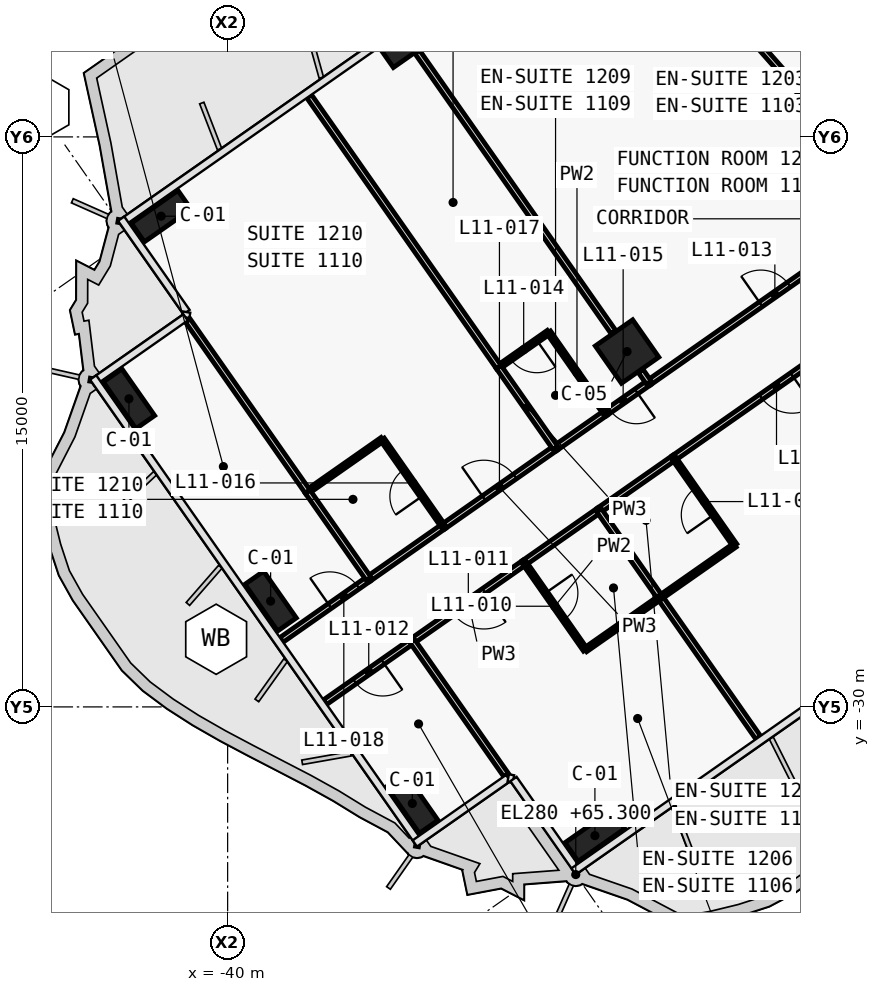
"""IFC4 building model, lengths in metres.
Left out: names, types, materials, properties, quantities, classifications, styles, units other than length and angle.
Written with IfcOpenShell. Run it as: python <this file> out.ifc"""

import sys

from ifc_helpers import new_model, si_unit, direction, frame, frame_2d, origin, origin_2d, place, context, subcontext, project, spatial, polyline, rectangle, outline, extrude, element, fill, save


model = new_model("IFC4")
c1 = context("Model", 3, precision=1e-05, world=origin(), true_north=direction((0.0, 1.0)))
c2 = subcontext(c1, "Body", "Model", "MODEL_VIEW")
j1 = project(units=[si_unit("LENGTHUNIT", "METRE"), si_unit("PLANEANGLEUNIT", "RADIAN")], contexts=[c1])
p1 = place(None, origin())
s1 = spatial("IfcSite", under=j1, at=p1, CompositionType="ELEMENT")
p2 = place(p1, origin())
s2 = spatial("IfcBuilding", under=s1, at=p2, CompositionType="ELEMENT")
p3 = place(p2, frame((0.0, 0.0, 65.3)))
s3 = spatial("IfcBuildingStorey", under=s2, at=p3, CompositionType="ELEMENT", Elevation=65.3)
p4 = place(p3, frame((-21.708, -15.2, 0.0), z_axis=(0.0, 0.0, 1.0), x_axis=(-0.573576324356, 0.819152122709, 0.0)))
e1 = element("IfcWall", 1, at=p4, inside=s3, PredefinedType="SHEAR", context=c2, shape_type="SweptSolid", body=[
    extrude(outline(polyline([(0.0, 0.5), (0.0, -0.5), (9.2, -0.5), (9.2, 0.5), (0.0, 0.5)])), origin(), (0.0, 0.0, 1.0), 3.6),
])
p5 = place(p4, frame((6.1, 0.0, 0.0)))
e2 = element("IfcOpeningElement", 2, at=p5, cuts=e1, PredefinedType="OPENING", context=c2, shape_type="SweptSolid", body=[
    extrude(rectangle(XDim=1.8, YDim=2.1, at=frame_2d((0.9, 1.05))), frame((0.0, 0.51, 0.0), z_axis=(0.0, -1.0, 0.0), x_axis=(1.0, 0.0, 0.0)), (0.0, 0.0, 1.0), 1.02),
])
p6 = place(p4, frame((1.9, 0.0, 0.0)))
e3 = element("IfcOpeningElement", 3, at=p6, cuts=e1, PredefinedType="OPENING", context=c2, shape_type="SweptSolid", body=[
    extrude(rectangle(XDim=1.8, YDim=2.1, at=frame_2d((0.9, 1.05))), frame((0.0, 0.51, 0.0), z_axis=(0.0, -1.0, 0.0), x_axis=(1.0, 0.0, 0.0)), (0.0, 0.0, 1.0), 1.02),
])
for number, where, z_axis, x_axis in (
    (4, (-30.336, -33.388, 0.0), (0.0, 0.0, 1.0), (-0.819, -0.574, 0.0)),
    (5, (-35.197, -12.498, 0.0), (0.0, 0.0, 1.0), (-0.819, -0.574, 0.0)),
    (6, (-41.75, -17.087, 0.0), (0.0, 0.0, 1.0), (-0.819, -0.574, 0.0)),
    (7, (-35.14, -32.541, 0.0), (0.0, 0.0, 1.0), (-0.574, 0.819, 0.0)),
    (8, (-38.869, -27.216, 0.0), (0.0, 0.0, 1.0), (-0.574, 0.819, 0.0)),
    (9, (-42.597, -21.892, 0.0), (0.0, 0.0, 1.0), (-0.574, 0.819, 0.0)),
):
    element("IfcColumn", number, at=place(p3, frame(where, z_axis=z_axis, x_axis=x_axis)), inside=s3, PredefinedType="COLUMN", context=c2, shape_type="SweptSolid", body=[
        extrude(rectangle(XDim=1.5, YDim=0.6, at=origin_2d()), origin(), (0.0, 0.0, 1.0), 3.6),
    ])
p7 = place(p3, frame((-29.49, -20.649, 0.0), z_axis=(0.0, 0.0, 1.0), x_axis=(-0.819152044289, -0.573576436351, 0.0)))
e10 = element("IfcColumn", 10, at=p7, inside=s3, PredefinedType="COLUMN", context=c2, shape_type="SweptSolid", body=[
    extrude(rectangle(XDim=1.2, YDim=1.2, at=origin_2d()), origin(), (0.0, 0.0, 1.0), 3.6),
])
p8 = place(p3, frame((-28.917, -21.469, 0.0), z_axis=(0.0, 0.0, 1.0), x_axis=(0.819152599934, 0.573575642807, 0.0)))
e11 = element("IfcWall", 11, at=p8, inside=s3, PredefinedType="PARTITIONING", context=c2, shape_type="SweptSolid", body=[
    extrude(rectangle(XDim=8.098, YDim=0.15, at=frame_2d((4.049, 0.0))), origin(), (0.0, 0.0, 1.0), 2.6),
])
p9 = place(p8, frame((3.599, 0.0, 0.0)))
e12 = element("IfcOpeningElement", 12, at=p9, cuts=e11, PredefinedType="OPENING", context=c2, shape_type="SweptSolid", body=[
    extrude(rectangle(XDim=0.9, YDim=2.1, at=frame_2d((0.45, 1.05))), frame((0.0, 0.085, 0.0), z_axis=(0.0, -1.0, 0.0), x_axis=(1.0, 0.0, 0.0)), (0.0, 0.0, 1.0), 0.17),
])
p10 = place(p3, frame((-28.914, -21.467, 0.0), z_axis=(0.0, 0.0, 1.0), x_axis=(-0.81914197737, -0.573590813132, 0.0)))
e13 = element("IfcWall", 13, at=p10, inside=s3, PredefinedType="PARTITIONING", context=c2, shape_type="SweptSolid", body=[
    extrude(rectangle(XDim=1.403, YDim=0.15, at=frame_2d((0.701, 0.0))), origin(), (0.0, 0.0, 1.0), 2.6),
])
p11 = place(p10, frame((0.403, 0.0, 0.0)))
e14 = element("IfcOpeningElement", 14, at=p11, cuts=e13, PredefinedType="OPENING", context=c2, shape_type="SweptSolid", body=[
    extrude(rectangle(XDim=0.85, YDim=2.1, at=frame_2d((0.425, 1.05))), frame((0.0, 0.085, 0.0), z_axis=(0.0, -1.0, 0.0), x_axis=(1.0, 0.0, 0.0)), (0.0, 0.0, 1.0), 0.17),
])
p12 = place(p3, frame((-31.375, -23.19, 0.0), z_axis=(0.0, 0.0, 1.0), x_axis=(0.819189013667, 0.573523634986, 0.0)))
e15 = element("IfcWall", 15, at=p12, inside=s3, PredefinedType="PARTITIONING", context=c2, shape_type="SweptSolid", body=[
    extrude(rectangle(XDim=1.604, YDim=0.15, at=frame_2d((0.802, 0.0))), origin(), (0.0, 0.0, 1.0), 3.32),
])
p13 = place(p3, frame((-34.323, -25.254, 0.0), z_axis=(0.0, 0.0, 1.0), x_axis=(0.819145961204, 0.573585123798, 0.0)))
e16 = element("IfcWall", 16, at=p13, inside=s3, PredefinedType="PARTITIONING", context=c2, shape_type="SweptSolid", body=[
    extrude(rectangle(XDim=3.603, YDim=0.15, at=frame_2d((1.802, 0.0))), origin(), (0.0, 0.0, 1.0), 3.32),
])
p14 = place(p13, frame((1.301, 0.0, 0.0)))
e17 = element("IfcOpeningElement", 17, at=p14, cuts=e16, PredefinedType="OPENING", context=c2, shape_type="SweptSolid", body=[
    extrude(rectangle(XDim=1.0, YDim=2.1, at=frame_2d((0.5, 1.05))), frame((0.0, 0.085, 0.0), z_axis=(0.0, -1.0, 0.0), x_axis=(1.0, 0.0, 0.0)), (0.0, 0.0, 1.0), 0.17),
])
p15 = place(p3, frame((-36.29, -26.631, 0.0), z_axis=(0.0, 0.0, 1.0), x_axis=(0.819160338113, 0.573564591361, 0.0)))
e18 = element("IfcWall", 18, at=p15, inside=s3, PredefinedType="PARTITIONING", context=c2, shape_type="SweptSolid", body=[
    extrude(rectangle(XDim=2.404, YDim=0.15, at=frame_2d((1.202, 0.0))), origin(), (0.0, 0.0, 1.0), 3.32),
])
p16 = place(p3, frame((-38.582, -28.236, 0.0), z_axis=(0.0, 0.0, 1.0), x_axis=(0.819137759006, 0.573596837309, 0.0)))
e19 = element("IfcWall", 19, at=p16, inside=s3, PredefinedType="PARTITIONING", context=c2, shape_type="SweptSolid", body=[
    extrude(rectangle(XDim=2.802, YDim=0.15, at=frame_2d((1.401, 0.0))), origin(), (0.0, 0.0, 1.0), 2.5),
])
p17 = place(p16, frame((1.551, 0.0, 0.0)))
e20 = element("IfcOpeningElement", 20, at=p17, cuts=e19, PredefinedType="OPENING", context=c2, shape_type="SweptSolid", body=[
    extrude(rectangle(XDim=0.9, YDim=2.1, at=frame_2d((0.45, 1.05))), frame((0.0, 0.085, 0.0), z_axis=(0.0, -1.0, 0.0), x_axis=(1.0, 0.0, 0.0)), (0.0, 0.0, 1.0), 0.17),
])
p18 = place(p3, frame((-22.852, -19.664, 0.0), z_axis=(0.0, 0.0, 1.0), x_axis=(-0.819141582452, -0.573591377113, 0.0)))
e21 = element("IfcWall", 21, at=p18, inside=s3, PredefinedType="PARTITIONING", context=c2, shape_type="SweptSolid", body=[
    extrude(rectangle(XDim=6.603, YDim=0.15, at=frame_2d((3.301, 0.0))), origin(), (0.0, 0.0, 1.0), 2.6),
])
p19 = place(p18, frame((2.802, 0.0, 0.0)))
e22 = element("IfcOpeningElement", 22, at=p19, cuts=e21, PredefinedType="OPENING", context=c2, shape_type="SweptSolid", body=[
    extrude(rectangle(XDim=1.0, YDim=2.1, at=frame_2d((0.5, 1.05))), frame((0.0, 0.085, 0.0), z_axis=(0.0, -1.0, 0.0), x_axis=(1.0, 0.0, 0.0)), (0.0, 0.0, 1.0), 0.17),
])
p20 = place(p3, frame((-28.259, -23.449, 0.0), z_axis=(0.0, 0.0, 1.0), x_axis=(-0.819146032251, -0.573585022335, 0.0)))
e23 = element("IfcWall", 23, at=p20, inside=s3, PredefinedType="PARTITIONING", context=c2, shape_type="SweptSolid", body=[
    extrude(rectangle(XDim=2.404, YDim=0.15, at=frame_2d((1.202, 0.0))), origin(), (0.0, 0.0, 1.0), 3.32),
])
p21 = place(p3, frame((-32.191, -26.203, 0.0), z_axis=(0.0, 0.0, 1.0), x_axis=(-0.819145961204, -0.573585123798, 0.0)))
e24 = element("IfcWall", 24, at=p21, inside=s3, PredefinedType="PARTITIONING", context=c2, shape_type="SweptSolid", body=[
    extrude(rectangle(XDim=3.603, YDim=0.15, at=frame_2d((1.802, 0.0))), origin(), (0.0, 0.0, 1.0), 3.32),
])
p22 = place(p21, frame((1.301, 0.0, 0.0)))
e25 = element("IfcOpeningElement", 25, at=p22, cuts=e24, PredefinedType="OPENING", context=c2, shape_type="SweptSolid", body=[
    extrude(rectangle(XDim=1.0, YDim=2.1, at=frame_2d((0.5, 1.05))), frame((0.0, 0.085, 0.0), z_axis=(0.0, -1.0, 0.0), x_axis=(1.0, 0.0, 0.0)), (0.0, 0.0, 1.0), 0.17),
])
p23 = place(p3, frame((-30.225, -24.826, 0.0), z_axis=(0.0, 0.0, 1.0), x_axis=(-0.819146032251, -0.573585022335, 0.0)))
e26 = element("IfcWall", 26, at=p23, inside=s3, PredefinedType="PARTITIONING", context=c2, shape_type="SweptSolid", body=[
    extrude(rectangle(XDim=2.404, YDim=0.15, at=frame_2d((1.202, 0.0))), origin(), (0.0, 0.0, 1.0), 3.32),
])
p24 = place(p3, frame((-35.139, -28.267, 0.0), z_axis=(0.0, 0.0, 1.0), x_axis=(-0.819125488359, -0.573614360281, 0.0)))
e27 = element("IfcWall", 27, at=p24, inside=s3, PredefinedType="PARTITIONING", context=c2, shape_type="SweptSolid", body=[
    extrude(rectangle(XDim=2.802, YDim=0.15, at=frame_2d((1.401, 0.0))), origin(), (0.0, 0.0, 1.0), 2.5),
])
p25 = place(p24, frame((0.951, 0.0, 0.0)))
e28 = element("IfcOpeningElement", 28, at=p25, cuts=e27, PredefinedType="OPENING", context=c2, shape_type="SweptSolid", body=[
    extrude(rectangle(XDim=0.9, YDim=2.1, at=frame_2d((0.45, 1.05))), frame((0.0, 0.085, 0.0), z_axis=(0.0, -1.0, 0.0), x_axis=(1.0, 0.0, 0.0)), (0.0, 0.0, 1.0), 0.17),
])
p26 = place(p3, frame((-22.284, -16.827, 0.0), z_axis=(0.0, 0.0, 1.0), x_axis=(-0.661545117561, 0.749905365651, 0.0)))
e29 = element("IfcWall", 29, at=p26, inside=s3, PredefinedType="PARTITIONING", context=c2, shape_type="SweptSolid", body=[
    extrude(rectangle(XDim=6.543, YDim=0.15, at=frame_2d((3.271, 0.0))), origin(), (0.0, 0.0, 1.0), 2.6),
])
p27 = place(p3, frame((-28.916, -21.468, 0.0), z_axis=(0.0, 0.0, 1.0), x_axis=(-0.572944929411, 0.819593867633, 0.0)))
e30 = element("IfcWall", 30, at=p27, inside=s3, PredefinedType="PARTITIONING", context=c2, shape_type="SweptSolid", body=[
    extrude(rectangle(XDim=0.38, YDim=0.15, at=frame_2d((0.19, 0.0))), origin(), (0.0, 0.0, 1.0), 2.6),
])
p28 = place(p3, frame((-29.845, -20.141, 0.0), z_axis=(0.0, 0.0, 1.0), x_axis=(-0.573558725113, 0.819164445546, 0.0)))
e31 = element("IfcWall", 31, at=p28, inside=s3, PredefinedType="PARTITIONING", context=c2, shape_type="SweptSolid", body=[
    extrude(rectangle(XDim=9.01, YDim=0.15, at=frame_2d((4.505, 0.0))), origin(), (0.0, 0.0, 1.0), 2.6),
])
p29 = place(p3, frame((-30.062, -22.27, 0.0), z_axis=(0.0, 0.0, 1.0), x_axis=(-0.573537965655, 0.819178980414, 0.0)))
e32 = element("IfcWall", 32, at=p29, inside=s3, PredefinedType="PARTITIONING", context=c2, shape_type="SweptSolid", body=[
    extrude(rectangle(XDim=2.6, YDim=0.12, at=frame_2d((1.3, 0.0))), origin(), (0.0, 0.0, 1.0), 2.6),
])
p30 = place(p3, frame((-31.555, -20.14, 0.0), z_axis=(0.0, 0.0, 1.0), x_axis=(-0.819131543282, -0.57360571371, 0.0)))
e33 = element("IfcWall", 33, at=p30, inside=s3, PredefinedType="PARTITIONING", context=c2, shape_type="SweptSolid", body=[
    extrude(rectangle(XDim=1.6, YDim=0.12, at=frame_2d((0.8, 0.0))), origin(), (0.0, 0.0, 1.0), 3.32),
])
p31 = place(p30, frame((0.375, 0.0, 0.0)))
e34 = element("IfcOpeningElement", 34, at=p31, cuts=e33, PredefinedType="OPENING", context=c2, shape_type="SweptSolid", body=[
    extrude(rectangle(XDim=0.85, YDim=2.05, at=frame_2d((0.425, 1.025))), frame((0.0, 0.07, 0.0), z_axis=(0.0, -1.0, 0.0), x_axis=(1.0, 0.0, 0.0)), (0.0, 0.0, 1.0), 0.14),
])
p32 = place(p3, frame((-32.865, -21.058, 0.0), z_axis=(0.0, 0.0, 1.0), x_axis=(-0.573564051961, 0.819160715792, 0.0)))
e35 = element("IfcWall", 35, at=p32, inside=s3, PredefinedType="PARTITIONING", context=c2, shape_type="SweptSolid", body=[
    extrude(rectangle(XDim=8.699, YDim=0.15, at=frame_2d((4.35, 0.0))), origin(), (0.0, 0.0, 1.0), 2.5),
])
p33 = place(p3, frame((-31.373, -23.189, 0.0), z_axis=(0.0, 0.0, 1.0), x_axis=(-0.573600972199, 0.819134863556, 0.0)))
e36 = element("IfcWall", 36, at=p33, inside=s3, PredefinedType="PARTITIONING", context=c2, shape_type="SweptSolid", body=[
    extrude(rectangle(XDim=2.6, YDim=0.15, at=frame_2d((1.3, 0.0))), origin(), (0.0, 0.0, 1.0), 2.6),
])
p34 = place(p3, frame((-34.322, -25.253, 0.0), z_axis=(0.0, 0.0, 1.0), x_axis=(-0.573550118428, 0.819170471667, 0.0)))
e37 = element("IfcWall", 37, at=p34, inside=s3, PredefinedType="PARTITIONING", context=c2, shape_type="SweptSolid", body=[
    extrude(rectangle(XDim=2.8, YDim=0.12, at=frame_2d((1.4, 0.0))), origin(), (0.0, 0.0, 1.0), 2.6),
])
p35 = place(p34, frame((0.975, 0.0, 0.0)))
e38 = element("IfcOpeningElement", 38, at=p35, cuts=e37, PredefinedType="OPENING", context=c2, shape_type="SweptSolid", body=[
    extrude(rectangle(XDim=0.85, YDim=2.05, at=frame_2d((0.425, 1.025))), frame((0.0, 0.07, 0.0), z_axis=(0.0, -1.0, 0.0), x_axis=(1.0, 0.0, 0.0)), (0.0, 0.0, 1.0), 0.14),
])
p36 = place(p3, frame((-35.929, -22.959, 0.0), z_axis=(0.0, 0.0, 1.0), x_axis=(-0.819141114317, -0.573592045652, 0.0)))
e39 = element("IfcWall", 39, at=p36, inside=s3, PredefinedType="PARTITIONING", context=c2, shape_type="SweptSolid", body=[
    extrude(rectangle(XDim=2.4, YDim=0.12, at=frame_2d((1.2, 0.0))), origin(), (0.0, 0.0, 1.0), 3.32),
])
p37 = place(p3, frame((-37.895, -24.336, 0.0), z_axis=(0.0, 0.0, 1.0), x_axis=(-0.573530875885, 0.819183944183, 0.0)))
e40 = element("IfcWall", 40, at=p37, inside=s3, PredefinedType="PARTITIONING", context=c2, shape_type="SweptSolid", body=[
    extrude(rectangle(XDim=5.499, YDim=0.15, at=frame_2d((2.75, 0.0))), origin(), (0.0, 0.0, 1.0), 3.32),
])
p38 = place(p3, frame((-36.288, -26.63, 0.0), z_axis=(0.0, 0.0, 1.0), x_axis=(-0.573550118428, 0.819170471667, 0.0)))
e41 = element("IfcWall", 41, at=p38, inside=s3, PredefinedType="PARTITIONING", context=c2, shape_type="SweptSolid", body=[
    extrude(rectangle(XDim=2.8, YDim=0.15, at=frame_2d((1.4, 0.0))), origin(), (0.0, 0.0, 1.0), 2.6),
])
p39 = place(p3, frame((-28.62, -27.121, 0.0), z_axis=(0.0, 0.0, 1.0), x_axis=(0.819188907105, 0.573523787192, 0.0)))
e42 = element("IfcWall", 42, at=p39, inside=s3, PredefinedType="PARTITIONING", context=c2, shape_type="SweptSolid", body=[
    extrude(rectangle(XDim=2.4, YDim=0.12, at=frame_2d((1.2, 0.0))), origin(), (0.0, 0.0, 1.0), 3.32),
])
p40 = place(p3, frame((-26.653, -25.743, 0.0), z_axis=(0.0, 0.0, 1.0), x_axis=(-0.573608623498, 0.819129505664, 0.0)))
e43 = element("IfcWall", 43, at=p40, inside=s3, PredefinedType="PARTITIONING", context=c2, shape_type="SweptSolid", body=[
    extrude(rectangle(XDim=2.8, YDim=0.12, at=frame_2d((1.4, 0.0))), origin(), (0.0, 0.0, 1.0), 3.32),
])
p41 = place(p40, frame((0.975, 0.0, 0.0)))
e44 = element("IfcOpeningElement", 44, at=p41, cuts=e43, PredefinedType="OPENING", context=c2, shape_type="SweptSolid", body=[
    extrude(rectangle(XDim=0.85, YDim=2.05, at=frame_2d((0.425, 1.025))), frame((0.0, 0.07, 0.0), z_axis=(0.0, -1.0, 0.0), x_axis=(1.0, 0.0, 0.0)), (0.0, 0.0, 1.0), 0.14),
])
p42 = place(p3, frame((-26.039, -30.807, 0.0), z_axis=(0.0, 0.0, 1.0), x_axis=(-0.573589807488, 0.819142681555, 0.0)))
e45 = element("IfcWall", 45, at=p42, inside=s3, PredefinedType="PARTITIONING", context=c2, shape_type="SweptSolid", body=[
    extrude(rectangle(XDim=4.499, YDim=0.15, at=frame_2d((2.25, 0.0))), origin(), (0.0, 0.0, 1.0), 2.5),
])
p43 = place(p3, frame((-28.62, -27.121, 0.0), z_axis=(0.0, 0.0, 1.0), x_axis=(-0.573608623498, 0.819129505664, 0.0)))
e46 = element("IfcWall", 46, at=p43, inside=s3, PredefinedType="PARTITIONING", context=c2, shape_type="SweptSolid", body=[
    extrude(rectangle(XDim=2.8, YDim=0.15, at=frame_2d((1.4, 0.0))), origin(), (0.0, 0.0, 1.0), 3.32),
])
p44 = place(p3, frame((-32.193, -26.204, 0.0), z_axis=(0.0, 0.0, 1.0), x_axis=(0.573608623498, -0.819129505664, 0.0)))
e47 = element("IfcWall", 47, at=p44, inside=s3, PredefinedType="PARTITIONING", context=c2, shape_type="SweptSolid", body=[
    extrude(rectangle(XDim=2.8, YDim=0.12, at=frame_2d((1.4, 0.0))), origin(), (0.0, 0.0, 1.0), 3.32),
])
p45 = place(p44, frame((0.975, 0.0, 0.0)))
e48 = element("IfcOpeningElement", 48, at=p45, cuts=e47, PredefinedType="OPENING", context=c2, shape_type="SweptSolid", body=[
    extrude(rectangle(XDim=0.85, YDim=2.05, at=frame_2d((0.425, 1.025))), frame((0.0, 0.07, 0.0), z_axis=(0.0, -1.0, 0.0), x_axis=(1.0, 0.0, 0.0)), (0.0, 0.0, 1.0), 0.14),
])
p46 = place(p3, frame((-30.586, -28.498, 0.0), z_axis=(0.0, 0.0, 1.0), x_axis=(0.819141114317, 0.573592045652, 0.0)))
e49 = element("IfcWall", 49, at=p46, inside=s3, PredefinedType="PARTITIONING", context=c2, shape_type="SweptSolid", body=[
    extrude(rectangle(XDim=2.4, YDim=0.12, at=frame_2d((1.2, 0.0))), origin(), (0.0, 0.0, 1.0), 3.32),
])
p47 = place(p3, frame((-32.675, -31.791, 0.0), z_axis=(0.0, 0.0, 1.0), x_axis=(-0.573553792486, 0.819167899227, 0.0)))
e50 = element("IfcWall", 50, at=p47, inside=s3, PredefinedType="PARTITIONING", context=c2, shape_type="SweptSolid", body=[
    extrude(rectangle(XDim=4.3, YDim=0.15, at=frame_2d((2.15, 0.0))), origin(), (0.0, 0.0, 1.0), 3.32),
])
p48 = place(p41, origin())
e51 = element("IfcDoor", 51, at=p48, inside=s3, OperationType="SINGLE_SWING_RIGHT", PredefinedType="DOOR", context=c2, shape_type="SweptSolid", body=[
    extrude(rectangle(XDim=0.85, YDim=2.05, at=frame_2d((0.425, 1.025))), frame((0.0, 0.025, 0.0), z_axis=(0.0, -1.0, 0.0), x_axis=(1.0, 0.0, 0.0)), (0.0, 0.0, 1.0), 0.05),
])
fill(e44, e51)
p49 = place(p19, origin())
e52 = element("IfcDoor", 52, at=p49, inside=s3, OperationType="SINGLE_SWING_RIGHT", PredefinedType="DOOR", context=c2, shape_type="SweptSolid", body=[
    extrude(rectangle(XDim=1.0, YDim=2.1, at=frame_2d((0.5, 1.05))), frame((0.0, 0.025, 0.0), z_axis=(0.0, -1.0, 0.0), x_axis=(1.0, 0.0, 0.0)), (0.0, 0.0, 1.0), 0.05),
])
fill(e22, e52)
p50 = place(p45, origin())
e53 = element("IfcDoor", 53, at=p50, inside=s3, OperationType="SINGLE_SWING_RIGHT", PredefinedType="DOOR", context=c2, shape_type="SweptSolid", body=[
    extrude(rectangle(XDim=0.85, YDim=2.05, at=frame_2d((0.425, 1.025))), frame((0.0, 0.025, 0.0), z_axis=(0.0, -1.0, 0.0), x_axis=(1.0, 0.0, 0.0)), (0.0, 0.0, 1.0), 0.05),
])
fill(e48, e53)
p51 = place(p22, origin())
e54 = element("IfcDoor", 54, at=p51, inside=s3, OperationType="SINGLE_SWING_LEFT", PredefinedType="DOOR", context=c2, shape_type="SweptSolid", body=[
    extrude(rectangle(XDim=1.0, YDim=2.1, at=frame_2d((0.5, 1.05))), frame((0.0, 0.025, 0.0), z_axis=(0.0, -1.0, 0.0), x_axis=(1.0, 0.0, 0.0)), (0.0, 0.0, 1.0), 0.05),
])
fill(e25, e54)
p52 = place(p25, origin())
e55 = element("IfcDoor", 55, at=p52, inside=s3, OperationType="SINGLE_SWING_RIGHT", PredefinedType="DOOR", context=c2, shape_type="SweptSolid", body=[
    extrude(rectangle(XDim=0.9, YDim=2.1, at=frame_2d((0.45, 1.05))), frame((0.0, 0.025, 0.0), z_axis=(0.0, -1.0, 0.0), x_axis=(1.0, 0.0, 0.0)), (0.0, 0.0, 1.0), 0.05),
])
fill(e28, e55)
p53 = place(p9, origin())
e56 = element("IfcDoor", 56, at=p53, inside=s3, OperationType="SINGLE_SWING_LEFT", PredefinedType="DOOR", context=c2, shape_type="SweptSolid", body=[
    extrude(rectangle(XDim=0.9, YDim=2.1, at=frame_2d((0.45, 1.05))), frame((0.0, 0.025, 0.0), z_axis=(0.0, -1.0, 0.0), x_axis=(1.0, 0.0, 0.0)), (0.0, 0.0, 1.0), 0.05),
])
fill(e12, e56)
p54 = place(p31, origin())
e57 = element("IfcDoor", 57, at=p54, inside=s3, OperationType="SINGLE_SWING_RIGHT", PredefinedType="DOOR", context=c2, shape_type="SweptSolid", body=[
    extrude(rectangle(XDim=0.85, YDim=2.05, at=frame_2d((0.425, 1.025))), frame((0.0, 0.025, 0.0), z_axis=(0.0, -1.0, 0.0), x_axis=(1.0, 0.0, 0.0)), (0.0, 0.0, 1.0), 0.05),
])
fill(e34, e57)
p55 = place(p11, origin())
e58 = element("IfcDoor", 58, at=p55, inside=s3, OperationType="SINGLE_SWING_LEFT", PredefinedType="DOOR", context=c2, shape_type="SweptSolid", body=[
    extrude(rectangle(XDim=0.85, YDim=2.1, at=frame_2d((0.425, 1.05))), frame((0.0, 0.025, 0.0), z_axis=(0.0, -1.0, 0.0), x_axis=(1.0, 0.0, 0.0)), (0.0, 0.0, 1.0), 0.05),
])
fill(e14, e58)
p56 = place(p35, origin())
e59 = element("IfcDoor", 59, at=p56, inside=s3, OperationType="SINGLE_SWING_RIGHT", PredefinedType="DOOR", context=c2, shape_type="SweptSolid", body=[
    extrude(rectangle(XDim=0.85, YDim=2.05, at=frame_2d((0.425, 1.025))), frame((0.0, 0.025, 0.0), z_axis=(0.0, -1.0, 0.0), x_axis=(1.0, 0.0, 0.0)), (0.0, 0.0, 1.0), 0.05),
])
fill(e38, e59)
p57 = place(p14, origin())
e60 = element("IfcDoor", 60, at=p57, inside=s3, OperationType="SINGLE_SWING_LEFT", PredefinedType="DOOR", context=c2, shape_type="SweptSolid", body=[
    extrude(rectangle(XDim=1.0, YDim=2.1, at=frame_2d((0.5, 1.05))), frame((0.0, 0.025, 0.0), z_axis=(0.0, -1.0, 0.0), x_axis=(1.0, 0.0, 0.0)), (0.0, 0.0, 1.0), 0.05),
])
fill(e17, e60)
p58 = place(p17, origin())
e61 = element("IfcDoor", 61, at=p58, inside=s3, OperationType="SINGLE_SWING_RIGHT", PredefinedType="DOOR", context=c2, shape_type="SweptSolid", body=[
    extrude(rectangle(XDim=0.9, YDim=2.1, at=frame_2d((0.45, 1.05))), frame((0.0, 0.025, 0.0), z_axis=(0.0, -1.0, 0.0), x_axis=(1.0, 0.0, 0.0)), (0.0, 0.0, 1.0), 0.05),
])
fill(e20, e61)
save(model, sys.argv[1])
